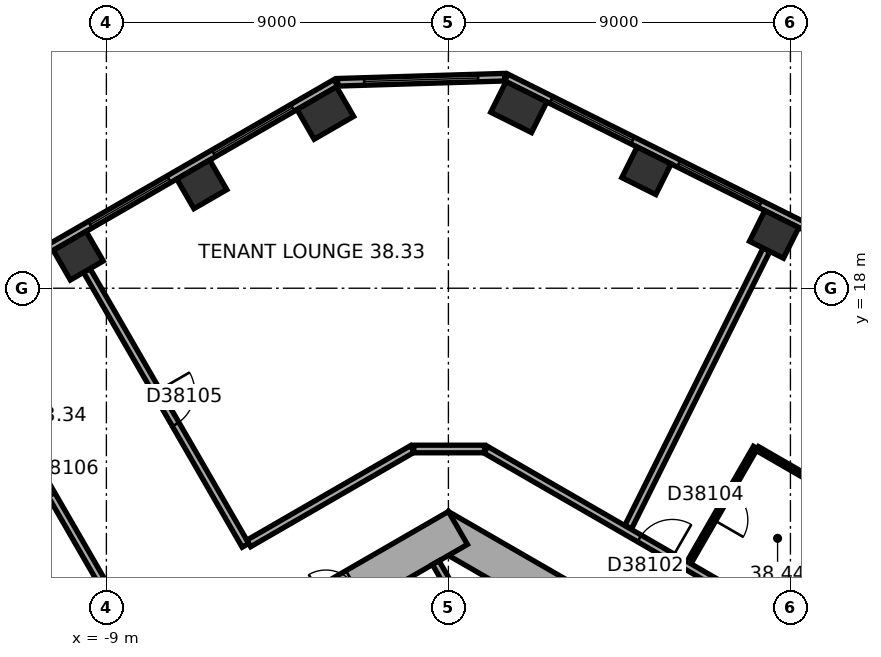
"""IFC4 building model, lengths in metres.
Left out: names, types, materials, properties, quantities, classifications, styles, units other than length and angle.
Written with IfcOpenShell. Run it as: python <this file> out.ifc"""

import sys

from ifc_helpers import new_model, si_unit, direction, frame, frame_2d, origin, origin_2d, place, context, subcontext, project, spatial, rectangle, extrude, element, fill, save


model = new_model("IFC4")
c1 = context("Model", 3, precision=1e-05, world=origin(), true_north=direction((0.0, 1.0)))
c2 = subcontext(c1, "Body", "Model", "MODEL_VIEW")
j1 = project(units=[si_unit("LENGTHUNIT", "METRE"), si_unit("PLANEANGLEUNIT", "RADIAN")], contexts=[c1])
p1 = place(None, origin())
s1 = spatial("IfcSite", under=j1, at=p1, CompositionType="ELEMENT")
p2 = place(p1, origin())
s2 = spatial("IfcBuilding", under=s1, at=p2, CompositionType="ELEMENT")
p3 = place(p2, frame((0.0, 0.0, 157.7)))
s3 = spatial("IfcBuildingStorey", under=s2, at=p3, CompositionType="ELEMENT", Elevation=157.7)
for number, where, z_axis, x_axis in (
    (1, (8.571, 19.416, 0.0), (0.0, 0.0, 1.0), (-0.895, 0.446, 0.0)),
    (2, (5.211, 21.091, 0.0), (0.0, 0.0, 1.0), (-0.895, 0.446, 0.0)),
):
    element("IfcColumn", number, at=place(p3, frame(where, z_axis=z_axis, x_axis=x_axis)), inside=s3, PredefinedType="COLUMN", context=c2, shape_type="SweptSolid", body=[
        extrude(rectangle(XDim=1.0, YDim=0.9, at=origin_2d()), origin(), (0.0, 0.0, 1.0), 3.7),
    ])
for number, where, z_axis, x_axis in (
    (3, (1.852, 22.766, 0.0), (0.0, 0.0, 1.0), (-0.895, 0.446, 0.0)),
    (4, (-3.238, 22.61, 0.0), (0.0, 0.0, 1.0), (-0.866, -0.5, 0.0)),
):
    element("IfcColumn", number, at=place(p3, frame(where, z_axis=z_axis, x_axis=x_axis)), inside=s3, PredefinedType="COLUMN", context=c2, shape_type="SweptSolid", body=[
        extrude(rectangle(XDim=1.2, YDim=0.9, at=origin_2d()), origin(), (0.0, 0.0, 1.0), 3.7),
    ])
for number, where, z_axis, x_axis in (
    (5, (-6.489, 20.733, 0.0), (0.0, 0.0, 1.0), (-0.866, -0.5, 0.0)),
    (6, (-9.74, 18.856, 0.0), (0.0, 0.0, 1.0), (-0.866, -0.5, 0.0)),
):
    element("IfcColumn", number, at=place(p3, frame(where, z_axis=z_axis, x_axis=x_axis)), inside=s3, PredefinedType="COLUMN", context=c2, shape_type="SweptSolid", body=[
        extrude(rectangle(XDim=1.0, YDim=0.9, at=origin_2d()), origin(), (0.0, 0.0, 1.0), 3.7),
    ])
p4 = place(p3, frame((10.25, 5.629, 0.0), z_axis=(0.0, 0.0, 1.0), x_axis=(-0.866022616891, 0.50000482701, 0.0)))
e7 = element("IfcWall", 7, at=p4, inside=s3, PredefinedType="SHEAR", context=c2, shape_type="SweptSolid", body=[
    extrude(rectangle(XDim=12.125, YDim=1.0, at=frame_2d((6.062, 0.0))), origin(), (0.0, 0.0, 1.0), 3.7),
])
p5 = place(p4, frame((2.712, 0.0, 0.0)))
e8 = element("IfcOpeningElement", 8, at=p5, cuts=e7, PredefinedType="OPENING", context=c2, shape_type="SweptSolid", body=[
    extrude(rectangle(XDim=0.9, YDim=2.1, at=frame_2d((0.45, 1.05))), frame((0.0, 0.51, 0.0), z_axis=(0.0, -1.0, 0.0), x_axis=(1.0, 0.0, 0.0)), (0.0, 0.0, 1.0), 1.02),
])
p6 = place(p4, frame((6.612, 0.0, 0.0)))
e9 = element("IfcOpeningElement", 9, at=p6, cuts=e7, PredefinedType="OPENING", context=c2, shape_type="SweptSolid", body=[
    extrude(rectangle(XDim=0.9, YDim=2.1, at=frame_2d((0.45, 1.05))), frame((0.0, 0.51, 0.0), z_axis=(0.0, -1.0, 0.0), x_axis=(1.0, 0.0, 0.0)), (0.0, 0.0, 1.0), 1.02),
])
p7 = place(p3, frame((0.25, 11.691, 0.0), z_axis=(0.0, 0.0, 1.0), x_axis=(-0.866022616891, -0.50000482701, 0.0)))
e10 = element("IfcWall", 10, at=p7, inside=s3, PredefinedType="SHEAR", context=c2, shape_type="SweptSolid", body=[
    extrude(rectangle(XDim=12.125, YDim=1.0, at=frame_2d((6.062, 0.0))), origin(), (0.0, 0.0, 1.0), 3.7),
])
p8 = place(p7, frame((6.262, 0.0, 0.0)))
e11 = element("IfcOpeningElement", 11, at=p8, cuts=e10, PredefinedType="OPENING", context=c2, shape_type="SweptSolid", body=[
    extrude(rectangle(XDim=1.5, YDim=2.1, at=frame_2d((0.75, 1.05))), frame((0.0, 0.51, 0.0), z_axis=(0.0, -1.0, 0.0), x_axis=(1.0, 0.0, 0.0)), (0.0, 0.0, 1.0), 1.02),
])
p9 = place(p7, frame((3.112, 0.0, 0.0)))
e12 = element("IfcOpeningElement", 12, at=p9, cuts=e10, PredefinedType="OPENING", context=c2, shape_type="SweptSolid", body=[
    extrude(rectangle(XDim=0.9, YDim=2.1, at=frame_2d((0.45, 1.05))), frame((0.0, 0.51, 0.0), z_axis=(0.0, -1.0, 0.0), x_axis=(1.0, 0.0, 0.0)), (0.0, 0.0, 1.0), 1.02),
])
p10 = place(p3, frame((19.464, 14.599, 0.0), z_axis=(0.0, 0.0, 1.0), x_axis=(-0.894935755043, 0.446195018289, 0.0)))
e13 = element("IfcWall", 13, at=p10, inside=s3, PredefinedType="STANDARD", context=c2, shape_type="SweptSolid", body=[
    extrude(rectangle(XDim=20.044, YDim=0.2, at=frame_2d((10.022, 0.0))), origin(), (0.0, 0.0, 1.0), 3.7),
])
p11 = place(p10, frame((1.313, 0.0, 0.9)))
e14 = element("IfcOpeningElement", 14, at=p11, cuts=e13, PredefinedType="OPENING", context=c2, shape_type="SweptSolid", body=[
    extrude(rectangle(XDim=2.4, YDim=2.0, at=frame_2d((1.2, 1.0))), frame((0.0, 0.11, 0.0), z_axis=(0.0, -1.0, 0.0), x_axis=(1.0, 0.0, 0.0)), (0.0, 0.0, 1.0), 0.22),
])
p12 = place(p10, frame((5.067, 0.0, 0.9)))
e15 = element("IfcOpeningElement", 15, at=p12, cuts=e13, PredefinedType="OPENING", context=c2, shape_type="SweptSolid", body=[
    extrude(rectangle(XDim=2.4, YDim=2.0, at=frame_2d((1.2, 1.0))), frame((0.0, 0.11, 0.0), z_axis=(0.0, -1.0, 0.0), x_axis=(1.0, 0.0, 0.0)), (0.0, 0.0, 1.0), 0.22),
])
p13 = place(p10, frame((8.821, 0.0, 0.9)))
e16 = element("IfcOpeningElement", 16, at=p13, cuts=e13, PredefinedType="OPENING", context=c2, shape_type="SweptSolid", body=[
    extrude(rectangle(XDim=2.4, YDim=2.0, at=frame_2d((1.2, 1.0))), frame((0.0, 0.11, 0.0), z_axis=(0.0, -1.0, 0.0), x_axis=(1.0, 0.0, 0.0)), (0.0, 0.0, 1.0), 0.22),
])
p14 = place(p10, frame((12.575, 0.0, 0.9)))
e17 = element("IfcOpeningElement", 17, at=p14, cuts=e13, PredefinedType="OPENING", context=c2, shape_type="SweptSolid", body=[
    extrude(rectangle(XDim=2.4, YDim=2.0, at=frame_2d((1.2, 1.0))), frame((0.0, 0.11, 0.0), z_axis=(0.0, -1.0, 0.0), x_axis=(1.0, 0.0, 0.0)), (0.0, 0.0, 1.0), 0.22),
])
p15 = place(p10, frame((16.329, 0.0, 0.9)))
e18 = element("IfcOpeningElement", 18, at=p15, cuts=e13, PredefinedType="OPENING", context=c2, shape_type="SweptSolid", body=[
    extrude(rectangle(XDim=2.4, YDim=2.0, at=frame_2d((1.2, 1.0))), frame((0.0, 0.11, 0.0), z_axis=(0.0, -1.0, 0.0), x_axis=(1.0, 0.0, 0.0)), (0.0, 0.0, 1.0), 0.22),
])
p16 = place(p3, frame((1.479, 23.553, 0.0), z_axis=(0.0, 0.0, 1.0), x_axis=(-0.999534786117, -0.03049936625, 0.0)))
e19 = element("IfcWall", 19, at=p16, inside=s3, PredefinedType="STANDARD", context=c2, shape_type="SweptSolid", body=[
    extrude(rectangle(XDim=4.395, YDim=0.2, at=frame_2d((2.197, 0.0))), origin(), (0.0, 0.0, 1.0), 3.7),
])
p17 = place(p16, frame((0.698, 0.0, 0.9)))
e20 = element("IfcOpeningElement", 20, at=p17, cuts=e19, PredefinedType="OPENING", context=c2, shape_type="SweptSolid", body=[
    extrude(rectangle(XDim=3.0, YDim=2.0, at=frame_2d((1.5, 1.0))), frame((0.0, 0.11, 0.0), z_axis=(0.0, -1.0, 0.0), x_axis=(1.0, 0.0, 0.0)), (0.0, 0.0, 1.0), 0.22),
])
p18 = place(p3, frame((-2.961, 23.405, 0.0), z_axis=(0.0, 0.0, 1.0), x_axis=(-0.866023315909, -0.500003616288, 0.0)))
e21 = element("IfcWall", 21, at=p18, inside=s3, PredefinedType="STANDARD", context=c2, shape_type="SweptSolid", body=[
    extrude(rectangle(XDim=20.044, YDim=0.2, at=frame_2d((10.022, 0.0))), origin(), (0.0, 0.0, 1.0), 3.7),
])
p19 = place(p18, frame((1.314, 0.0, 0.9)))
e22 = element("IfcOpeningElement", 22, at=p19, cuts=e21, PredefinedType="OPENING", context=c2, shape_type="SweptSolid", body=[
    extrude(rectangle(XDim=2.4, YDim=2.0, at=frame_2d((1.2, 1.0))), frame((0.0, 0.11, 0.0), z_axis=(0.0, -1.0, 0.0), x_axis=(1.0, 0.0, 0.0)), (0.0, 0.0, 1.0), 0.22),
])
p20 = place(p18, frame((5.069, 0.0, 0.9)))
e23 = element("IfcOpeningElement", 23, at=p20, cuts=e21, PredefinedType="OPENING", context=c2, shape_type="SweptSolid", body=[
    extrude(rectangle(XDim=2.4, YDim=2.0, at=frame_2d((1.2, 1.0))), frame((0.0, 0.11, 0.0), z_axis=(0.0, -1.0, 0.0), x_axis=(1.0, 0.0, 0.0)), (0.0, 0.0, 1.0), 0.22),
])
p21 = place(p18, frame((8.823, 0.0, 0.9)))
e24 = element("IfcOpeningElement", 24, at=p21, cuts=e21, PredefinedType="OPENING", context=c2, shape_type="SweptSolid", body=[
    extrude(rectangle(XDim=2.4, YDim=2.0, at=frame_2d((1.2, 1.0))), frame((0.0, 0.11, 0.0), z_axis=(0.0, -1.0, 0.0), x_axis=(1.0, 0.0, 0.0)), (0.0, 0.0, 1.0), 0.22),
])
p22 = place(p18, frame((12.577, 0.0, 0.9)))
e25 = element("IfcOpeningElement", 25, at=p22, cuts=e21, PredefinedType="OPENING", context=c2, shape_type="SweptSolid", body=[
    extrude(rectangle(XDim=2.4, YDim=2.0, at=frame_2d((1.2, 1.0))), frame((0.0, 0.11, 0.0), z_axis=(0.0, -1.0, 0.0), x_axis=(1.0, 0.0, 0.0)), (0.0, 0.0, 1.0), 0.22),
])
p23 = place(p18, frame((16.331, 0.0, 0.9)))
e26 = element("IfcOpeningElement", 26, at=p23, cuts=e21, PredefinedType="OPENING", context=c2, shape_type="SweptSolid", body=[
    extrude(rectangle(XDim=2.4, YDim=2.0, at=frame_2d((1.2, 1.0))), frame((0.0, 0.11, 0.0), z_axis=(0.0, -1.0, 0.0), x_axis=(1.0, 0.0, 0.0)), (0.0, 0.0, 1.0), 0.22),
])
p24 = place(p3, frame((0.767, 8.872, 0.0), z_axis=(0.0, 0.0, 1.0), x_axis=(-0.499994660107, 0.866028486751, 0.0)))
e27 = element("IfcWall", 27, at=p24, inside=s3, PredefinedType="PARTITIONING", context=c2, shape_type="SweptSolid", body=[
    extrude(rectangle(XDim=2.2, YDim=0.2, at=frame_2d((1.1, 0.0))), origin(), (0.0, 0.0, 1.0), 3.42),
])
p25 = place(p3, frame((-12.766, 16.589, 0.0), z_axis=(0.0, 0.0, 1.0), x_axis=(0.500010139422, -0.866019549707, 0.0)))
e28 = element("IfcWall", 28, at=p25, inside=s3, PredefinedType="PARTITIONING", context=c2, shape_type="SweptSolid", body=[
    extrude(rectangle(XDim=8.35, YDim=0.2, at=frame_2d((4.175, 0.0))), origin(), (0.0, 0.0, 1.0), 3.42),
])
p26 = place(p25, frame((3.675, 0.0, 0.0)))
e29 = element("IfcOpeningElement", 29, at=p26, cuts=e28, PredefinedType="OPENING", context=c2, shape_type="SweptSolid", body=[
    extrude(rectangle(XDim=1.0, YDim=2.1, at=frame_2d((0.5, 1.05))), frame((0.0, 0.11, 0.0), z_axis=(0.0, -1.0, 0.0), x_axis=(1.0, 0.0, 0.0)), (0.0, 0.0, 1.0), 0.22),
])
p27 = place(p3, frame((-9.515, 18.466, 0.0), z_axis=(0.0, 0.0, 1.0), x_axis=(0.500010139422, -0.866019549707, 0.0)))
e30 = element("IfcWall", 30, at=p27, inside=s3, PredefinedType="PARTITIONING", context=c2, shape_type="SweptSolid", body=[
    extrude(rectangle(XDim=8.35, YDim=0.2, at=frame_2d((4.175, 0.0))), origin(), (0.0, 0.0, 1.0), 2.87),
])
p28 = place(p27, frame((3.675, 0.0, 0.0)))
e31 = element("IfcOpeningElement", 31, at=p28, cuts=e30, PredefinedType="OPENING", context=c2, shape_type="SweptSolid", body=[
    extrude(rectangle(XDim=1.0, YDim=2.1, at=frame_2d((0.5, 1.05))), frame((0.0, 0.11, 0.0), z_axis=(0.0, -1.0, 0.0), x_axis=(1.0, 0.0, 0.0)), (0.0, 0.0, 1.0), 0.22),
])
p29 = place(p3, frame((-0.95, 13.77, 0.0), z_axis=(0.0, 0.0, 1.0), x_axis=(-0.866036689987, -0.499980451214, 0.0)))
e32 = element("IfcWall", 32, at=p29, inside=s3, PredefinedType="PARTITIONING", context=c2, shape_type="SweptSolid", body=[
    extrude(rectangle(XDim=4.969, YDim=0.2, at=frame_2d((2.485, 0.0))), origin(), (0.0, 0.0, 1.0), 3.42),
])
p30 = place(p3, frame((0.95, 13.77, 0.0), z_axis=(0.0, 0.0, 1.0), x_axis=(-1.0, 0.0, 0.0)))
e33 = element("IfcWall", 33, at=p30, inside=s3, PredefinedType="PARTITIONING", context=c2, shape_type="SweptSolid", body=[
    extrude(rectangle(XDim=1.86, YDim=0.2, at=frame_2d((0.93, 0.0))), origin(), (0.0, 0.0, 1.0), 3.42),
])
p31 = place(p3, frame((6.33, 10.779, 0.0), z_axis=(0.0, 0.0, 1.0), x_axis=(0.500010275428, 0.866019471182, 0.0)))
e34 = element("IfcWall", 34, at=p31, inside=s3, PredefinedType="PARTITIONING", context=c2, shape_type="SweptSolid", body=[
    extrude(rectangle(XDim=3.5, YDim=0.12, at=frame_2d((1.75, 0.0))), origin(), (0.0, 0.0, 1.0), 3.42),
])
p32 = place(p31, frame((1.3, 0.0, 0.0)))
e35 = element("IfcOpeningElement", 35, at=p32, cuts=e34, PredefinedType="OPENING", context=c2, shape_type="SweptSolid", body=[
    extrude(rectangle(XDim=0.9, YDim=2.1, at=frame_2d((0.45, 1.05))), frame((0.0, 0.07, 0.0), z_axis=(0.0, -1.0, 0.0), x_axis=(1.0, 0.0, 0.0)), (0.0, 0.0, 1.0), 0.14),
])
p33 = place(p3, frame((8.132, 13.78, 0.0), z_axis=(0.0, 0.0, 1.0), x_axis=(0.866039519639, -0.499975549825, 0.0)))
e36 = element("IfcWall", 36, at=p33, inside=s3, PredefinedType="PARTITIONING", context=c2, shape_type="SweptSolid", body=[
    extrude(rectangle(XDim=3.34, YDim=0.12, at=frame_2d((1.67, 0.0))), origin(), (0.0, 0.0, 1.0), 3.42),
])
p34 = place(p3, frame((8.37, 19.013, 0.0), z_axis=(0.0, 0.0, 1.0), x_axis=(-0.446183598632, -0.894941448538, 0.0)))
e37 = element("IfcWall", 37, at=p34, inside=s3, PredefinedType="PARTITIONING", context=c2, shape_type="SweptSolid", body=[
    extrude(rectangle(XDim=8.156, YDim=0.2, at=frame_2d((4.078, 0.0))), origin(), (0.0, 0.0, 1.0), 3.42),
])
p35 = place(p3, frame((9.224, 8.993, 0.0), z_axis=(0.0, 0.0, 1.0), x_axis=(-0.866031754707, 0.499988999718, 0.0)))
e38 = element("IfcWall", 38, at=p35, inside=s3, PredefinedType="PARTITIONING", context=c2, shape_type="SweptSolid", body=[
    extrude(rectangle(XDim=9.514, YDim=0.2, at=frame_2d((4.757, 0.0))), origin(), (0.0, 0.0, 1.0), 3.42),
])
p36 = place(p35, frame((3.848, 0.0, 0.0)))
e39 = element("IfcOpeningElement", 39, at=p36, cuts=e38, PredefinedType="OPENING", context=c2, shape_type="SweptSolid", body=[
    extrude(rectangle(XDim=1.0, YDim=2.1, at=frame_2d((0.5, 1.05))), frame((0.0, 0.11, 0.0), z_axis=(0.0, -1.0, 0.0), x_axis=(1.0, 0.0, 0.0)), (0.0, 0.0, 1.0), 0.22),
])
p37 = place(p3, frame((10.994, 12.058, 0.0), z_axis=(0.0, 0.0, 1.0), x_axis=(-0.500009156386, -0.866020117278, 0.0)))
e40 = element("IfcWall", 40, at=p37, inside=s3, PredefinedType="PARTITIONING", context=c2, shape_type="SweptSolid", body=[
    extrude(rectangle(XDim=3.44, YDim=0.12, at=frame_2d((1.72, 0.0))), origin(), (0.0, 0.0, 1.0), 3.42),
])
p38 = place(p14, origin())
e41 = element("IfcWindow", 41, at=p38, inside=s3, PartitioningType="SINGLE_PANEL", PredefinedType="WINDOW", context=c2, shape_type="SweptSolid", body=[
    extrude(rectangle(XDim=2.4, YDim=2.0, at=frame_2d((1.2, 1.0))), frame((0.0, 0.03, 0.0), z_axis=(0.0, -1.0, 0.0), x_axis=(1.0, 0.0, 0.0)), (0.0, 0.0, 1.0), 0.06),
])
fill(e17, e41)
p39 = place(p15, origin())
e42 = element("IfcWindow", 42, at=p39, inside=s3, PartitioningType="SINGLE_PANEL", PredefinedType="WINDOW", context=c2, shape_type="SweptSolid", body=[
    extrude(rectangle(XDim=2.4, YDim=2.0, at=frame_2d((1.2, 1.0))), frame((0.0, 0.03, 0.0), z_axis=(0.0, -1.0, 0.0), x_axis=(1.0, 0.0, 0.0)), (0.0, 0.0, 1.0), 0.06),
])
fill(e18, e42)
p40 = place(p17, origin())
e43 = element("IfcWindow", 43, at=p40, inside=s3, PartitioningType="SINGLE_PANEL", PredefinedType="WINDOW", context=c2, shape_type="SweptSolid", body=[
    extrude(rectangle(XDim=3.0, YDim=2.0, at=frame_2d((1.5, 1.0))), frame((0.0, 0.03, 0.0), z_axis=(0.0, -1.0, 0.0), x_axis=(1.0, 0.0, 0.0)), (0.0, 0.0, 1.0), 0.06),
])
fill(e20, e43)
p41 = place(p19, origin())
e44 = element("IfcWindow", 44, at=p41, inside=s3, PartitioningType="SINGLE_PANEL", PredefinedType="WINDOW", context=c2, shape_type="SweptSolid", body=[
    extrude(rectangle(XDim=2.4, YDim=2.0, at=frame_2d((1.2, 1.0))), frame((0.0, 0.03, 0.0), z_axis=(0.0, -1.0, 0.0), x_axis=(1.0, 0.0, 0.0)), (0.0, 0.0, 1.0), 0.06),
])
fill(e22, e44)
p42 = place(p20, origin())
e45 = element("IfcWindow", 45, at=p42, inside=s3, PartitioningType="SINGLE_PANEL", PredefinedType="WINDOW", context=c2, shape_type="SweptSolid", body=[
    extrude(rectangle(XDim=2.4, YDim=2.0, at=frame_2d((1.2, 1.0))), frame((0.0, 0.03, 0.0), z_axis=(0.0, -1.0, 0.0), x_axis=(1.0, 0.0, 0.0)), (0.0, 0.0, 1.0), 0.06),
])
fill(e23, e45)
p43 = place(p36, origin())
e46 = element("IfcDoor", 46, at=p43, inside=s3, OperationType="SINGLE_SWING_LEFT", PredefinedType="DOOR", context=c2, shape_type="SweptSolid", body=[
    extrude(rectangle(XDim=1.0, YDim=2.1, at=frame_2d((0.5, 1.05))), frame((0.0, 0.025, 0.0), z_axis=(0.0, -1.0, 0.0), x_axis=(1.0, 0.0, 0.0)), (0.0, 0.0, 1.0), 0.05),
])
fill(e39, e46)
p44 = place(p32, origin())
e47 = element("IfcDoor", 47, at=p44, inside=s3, OperationType="SINGLE_SWING_LEFT", PredefinedType="DOOR", context=c2, shape_type="SweptSolid", body=[
    extrude(rectangle(XDim=0.9, YDim=2.1, at=frame_2d((0.45, 1.05))), frame((0.0, 0.025, 0.0), z_axis=(0.0, -1.0, 0.0), x_axis=(1.0, 0.0, 0.0)), (0.0, 0.0, 1.0), 0.05),
])
fill(e35, e47)
p45 = place(p28, origin())
e48 = element("IfcDoor", 48, at=p45, inside=s3, OperationType="SINGLE_SWING_LEFT", PredefinedType="DOOR", context=c2, shape_type="SweptSolid", body=[
    extrude(rectangle(XDim=1.0, YDim=2.1, at=frame_2d((0.5, 1.05))), frame((0.0, 0.025, 0.0), z_axis=(0.0, -1.0, 0.0), x_axis=(1.0, 0.0, 0.0)), (0.0, 0.0, 1.0), 0.05),
])
fill(e31, e48)
p46 = place(p26, origin())
e49 = element("IfcDoor", 49, at=p46, inside=s3, OperationType="SINGLE_SWING_LEFT", PredefinedType="DOOR", context=c2, shape_type="SweptSolid", body=[
    extrude(rectangle(XDim=1.0, YDim=2.1, at=frame_2d((0.5, 1.05))), frame((0.0, 0.025, 0.0), z_axis=(0.0, -1.0, 0.0), x_axis=(1.0, 0.0, 0.0)), (0.0, 0.0, 1.0), 0.05),
])
fill(e29, e49)
save(model, sys.argv[1])
